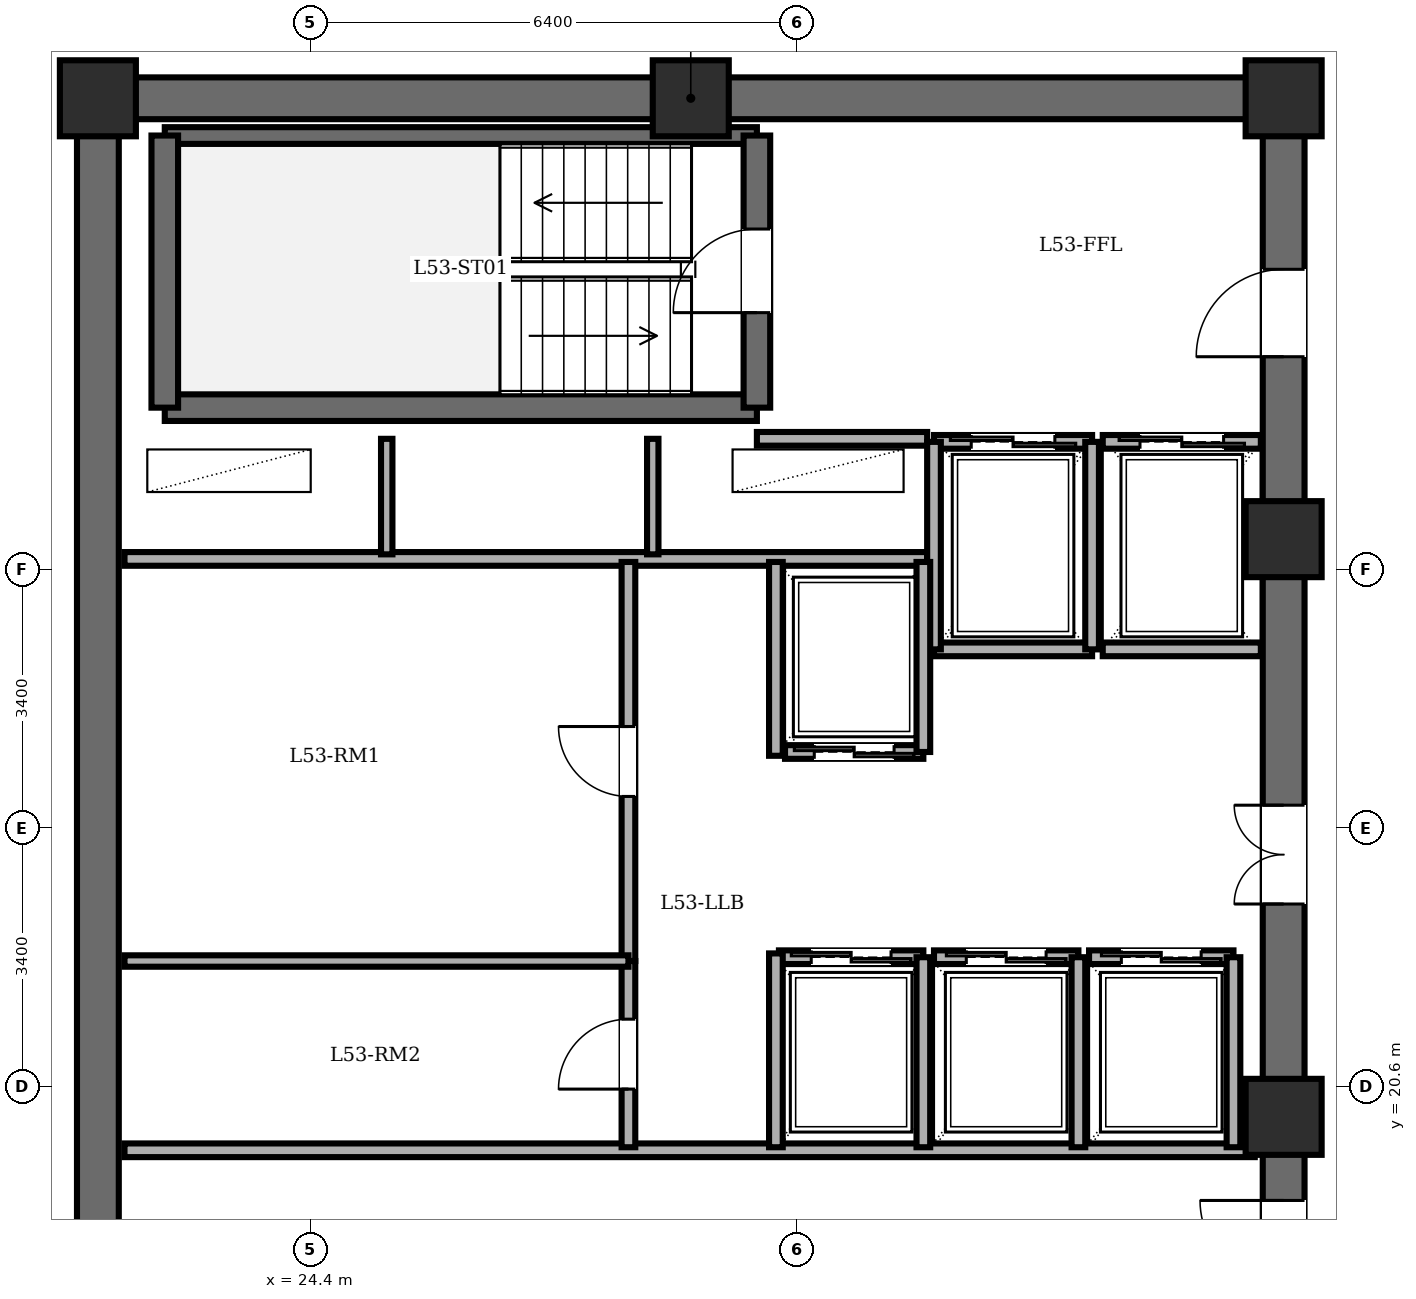
"""IFC4 building model, lengths in metres.
Left out: names, types, materials, properties, quantities, classifications, styles, units other than length and angle.
Written with IfcOpenShell. Run it as: python <this file> out.ifc"""

import sys

from ifc_helpers import new_model, si_unit, direction, frame, frame_2d, origin, origin_2d, place, context, subcontext, project, spatial, rectangle, extrude, element, fill, save


model = new_model("IFC4")
c1 = context("Model", 3, precision=1e-05, world=origin(), true_north=direction((0.0, 1.0)))
c2 = subcontext(c1, "Body", "Model", "MODEL_VIEW")
j1 = project(units=[si_unit("LENGTHUNIT", "METRE"), si_unit("PLANEANGLEUNIT", "RADIAN")], contexts=[c1])
p1 = place(None, origin())
s1 = spatial("IfcSite", under=j1, at=p1, CompositionType="ELEMENT")
p2 = place(p1, origin())
s2 = spatial("IfcBuilding", under=s1, at=p2, CompositionType="ELEMENT")
p3 = place(p2, frame((0.0, 0.0, 204.9)))
s3 = spatial("IfcBuildingStorey", under=s2, at=p3, CompositionType="ELEMENT", Elevation=204.9)
for number, where, z_axis, x_axis in (
    (1, (37.2, 20.2, 0.0), (0.0, 0.0, 1.0), (1.0, 0.0, 0.0)),
    (2, (37.2, 27.8, 0.0), (0.0, 0.0, 1.0), (1.0, 0.0, 0.0)),
    (3, (37.2, 33.6, 0.0), (0.0, 0.0, 1.0), (1.0, 0.0, 0.0)),
    (4, (29.4, 33.6, 0.0), (0.0, 0.0, 1.0), (1.0, 0.0, 0.0)),
    (5, (21.6, 33.6, 0.0), (0.0, 0.0, 1.0), (1.0, 0.0, 0.0)),
):
    element("IfcColumn", number, at=place(p3, frame(where, z_axis=z_axis, x_axis=x_axis)), inside=s3, PredefinedType="COLUMN", context=c2, shape_type="SweptSolid", body=[
        extrude(rectangle(XDim=1.0, YDim=1.0, at=origin_2d()), origin(), (0.0, 0.0, 1.0), 3.6),
    ])
p4 = place(p3, frame((21.6, 14.4, 0.0), z_axis=(0.0, 0.0, 1.0), x_axis=(0.0, 1.0, 0.0)))
e6 = element("IfcWall", 6, at=p4, inside=s3, PredefinedType="SHEAR", context=c2, shape_type="SweptSolid", body=[
    extrude(rectangle(XDim=19.2, YDim=0.55, at=frame_2d((9.6, 0.0))), origin(), (0.0, 0.0, 1.0), 3.4),
])
p5 = place(p3, frame((21.6, 33.6, 0.0), z_axis=(0.0, 0.0, 1.0), x_axis=(1.0, 0.0, 0.0)))
e7 = element("IfcWall", 7, at=p5, inside=s3, PredefinedType="SHEAR", context=c2, shape_type="SweptSolid", body=[
    extrude(rectangle(XDim=15.6, YDim=0.55, at=frame_2d((7.8, 0.0))), origin(), (0.0, 0.0, 1.0), 3.4),
])
p6 = place(p3, frame((37.2, 14.4, 0.0), z_axis=(0.0, 0.0, 1.0), x_axis=(0.0, 1.0, 0.0)))
e8 = element("IfcWall", 8, at=p6, inside=s3, PredefinedType="SHEAR", context=c2, shape_type="SweptSolid", body=[
    extrude(rectangle(XDim=19.2, YDim=0.55, at=frame_2d((9.6, 0.0))), origin(), (0.0, 0.0, 1.0), 3.4),
])
p7 = place(p6, frame((15.8, 0.0, 0.0)))
e9 = element("IfcOpeningElement", 9, at=p7, cuts=e8, PredefinedType="OPENING", context=c2, shape_type="SweptSolid", body=[
    extrude(rectangle(XDim=1.15, YDim=2.15, at=frame_2d((0.575, 1.075))), frame((0.0, 0.285, 0.0), z_axis=(0.0, -1.0, 0.0), x_axis=(1.0, 0.0, 0.0)), (0.0, 0.0, 1.0), 0.57),
])
p8 = place(p6, frame((3.6, 0.0, 0.0)))
e10 = element("IfcOpeningElement", 10, at=p8, cuts=e8, PredefinedType="OPENING", context=c2, shape_type="SweptSolid", body=[
    extrude(rectangle(XDim=1.1, YDim=2.15, at=frame_2d((0.55, 1.075))), frame((0.0, 0.285, 0.0), z_axis=(0.0, -1.0, 0.0), x_axis=(1.0, 0.0, 0.0)), (0.0, 0.0, 1.0), 0.57),
])
p9 = place(p6, frame((8.6, 0.0, 0.0)))
e11 = element("IfcOpeningElement", 11, at=p9, cuts=e8, PredefinedType="OPENING", context=c2, shape_type="SweptSolid", body=[
    extrude(rectangle(XDim=1.3, YDim=2.2, at=frame_2d((0.65, 1.1))), frame((0.0, 0.285, 0.0), z_axis=(0.0, -1.0, 0.0), x_axis=(1.0, 0.0, 0.0)), (0.0, 0.0, 1.0), 0.57),
])
p10 = place(p3, frame((22.48, 29.53, 0.0), z_axis=(0.0, 0.0, 1.0), x_axis=(1.0, 0.0, 0.0)))
e12 = element("IfcWall", 12, at=p10, inside=s3, PredefinedType="SOLIDWALL", context=c2, shape_type="SweptSolid", body=[
    extrude(rectangle(XDim=7.79, YDim=0.35, at=frame_2d((3.895, 0.0))), origin(), (0.0, 0.0, 1.0), 3.4),
])
p11 = place(p3, frame((22.48, 33.11, 0.0), z_axis=(0.0, 0.0, 1.0), x_axis=(1.0, 0.0, 0.0)))
e13 = element("IfcWall", 13, at=p11, inside=s3, PredefinedType="PARTITIONING", context=c2, shape_type="SweptSolid", body=[
    extrude(rectangle(XDim=7.79, YDim=0.22, at=frame_2d((3.895, 0.0))), origin(), (0.0, 0.0, 1.0), 3.4),
])
p12 = place(p3, frame((22.48, 29.53, 0.0), z_axis=(0.0, 0.0, 1.0), x_axis=(0.0, 1.0, 0.0)))
e14 = element("IfcWall", 14, at=p12, inside=s3, PredefinedType="SOLIDWALL", context=c2, shape_type="SweptSolid", body=[
    extrude(rectangle(XDim=3.58, YDim=0.35, at=frame_2d((1.79, 0.0))), origin(), (0.0, 0.0, 1.0), 3.4),
])
p13 = place(p3, frame((30.27, 29.53, 0.0), z_axis=(0.0, 0.0, 1.0), x_axis=(0.0, 1.0, 0.0)))
e15 = element("IfcWall", 15, at=p13, inside=s3, PredefinedType="SOLIDWALL", context=c2, shape_type="SweptSolid", body=[
    extrude(rectangle(XDim=3.58, YDim=0.35, at=frame_2d((1.79, 0.0))), origin(), (0.0, 0.0, 1.0), 3.4),
])
p14 = place(p13, frame((1.25, 0.0, 0.0)))
e16 = element("IfcOpeningElement", 16, at=p14, cuts=e15, PredefinedType="OPENING", context=c2, shape_type="SweptSolid", body=[
    extrude(rectangle(XDim=1.1, YDim=2.15, at=frame_2d((0.55, 1.075))), frame((0.0, 0.185, 0.0), z_axis=(0.0, -1.0, 0.0), x_axis=(1.0, 0.0, 0.0)), (0.0, 0.0, 1.0), 0.37),
])
p15 = place(p3, frame((30.27, 29.12, 0.0), z_axis=(0.0, 0.0, 1.0), x_axis=(1.0, 0.0, 0.0)))
e17 = element("IfcWall", 17, at=p15, inside=s3, PredefinedType="PARTITIONING", context=c2, shape_type="SweptSolid", body=[
    extrude(rectangle(XDim=2.24, YDim=0.18, at=frame_2d((1.12, 0.0))), origin(), (0.0, 0.0, 1.0), 3.4),
])
p16 = place(p3, frame((21.95, 27.54, 0.0), z_axis=(0.0, 0.0, 1.0), x_axis=(1.0, 0.0, 0.0)))
e18 = element("IfcWall", 18, at=p16, inside=s3, PredefinedType="PARTITIONING", context=c2, shape_type="SweptSolid", body=[
    extrude(rectangle(XDim=10.56, YDim=0.18, at=frame_2d((5.28, 0.0))), origin(), (0.0, 0.0, 1.0), 3.4),
])
for number, where, z_axis, x_axis in (
    (19, (25.4, 27.6, 0.0), (0.0, 0.0, 1.0), (0.0, 1.0, 0.0)),
    (20, (28.9, 27.6, 0.0), (0.0, 0.0, 1.0), (0.0, 1.0, 0.0)),
):
    element("IfcWall", number, at=place(p3, frame(where, z_axis=z_axis, x_axis=x_axis)), inside=s3, PredefinedType="PARTITIONING", context=c2, shape_type="SweptSolid", body=[
        extrude(rectangle(XDim=1.52, YDim=0.15, at=frame_2d((0.76, 0.0))), origin(), (0.0, 0.0, 1.0), 3.4),
    ])
p17 = place(p3, frame((21.95, 19.76, 0.0), z_axis=(0.0, 0.0, 1.0), x_axis=(1.0, 0.0, 0.0)))
e21 = element("IfcWall", 21, at=p17, inside=s3, PredefinedType="PARTITIONING", context=c2, shape_type="SweptSolid", body=[
    extrude(rectangle(XDim=14.87, YDim=0.18, at=frame_2d((7.435, 0.0))), origin(), (0.0, 0.0, 1.0), 3.4),
])
p18 = place(p3, frame((32.6, 29.08, 0.0), z_axis=(0.0, 0.0, 1.0), x_axis=(1.0, 0.0, 0.0)))
e22 = element("IfcWall", 22, at=p18, inside=s3, PredefinedType="PARTITIONING", context=c2, shape_type="SweptSolid", body=[
    extrude(rectangle(XDim=2.08, YDim=0.18, at=frame_2d((1.04, 0.0))), origin(), (0.0, 0.0, 1.0), 3.4),
])
p19 = place(p18, frame((0.49, 0.0, 0.0)))
e23 = element("IfcOpeningElement", 23, at=p19, cuts=e22, PredefinedType="OPENING", context=c2, shape_type="SweptSolid", body=[
    extrude(rectangle(XDim=1.1, YDim=2.2, at=frame_2d((0.55, 1.1))), frame((0.0, 0.1, 0.0), z_axis=(0.0, -1.0, 0.0), x_axis=(1.0, 0.0, 0.0)), (0.0, 0.0, 1.0), 0.2),
])
p20 = place(p3, frame((34.68, 26.35, 0.0), z_axis=(0.0, 0.0, 1.0), x_axis=(-1.0, 0.0, 0.0)))
e24 = element("IfcWall", 24, at=p20, inside=s3, PredefinedType="PARTITIONING", context=c2, shape_type="SweptSolid", body=[
    extrude(rectangle(XDim=2.08, YDim=0.18, at=frame_2d((1.04, 0.0))), origin(), (0.0, 0.0, 1.0), 3.4),
])
for number, where, z_axis, x_axis in (
    (25, (34.68, 26.35, 0.0), (0.0, 0.0, 1.0), (0.0, 1.0, 0.0)),
    (26, (32.6, 29.08, 0.0), (0.0, 0.0, 1.0), (0.0, -1.0, 0.0)),
):
    element("IfcWall", number, at=place(p3, frame(where, z_axis=z_axis, x_axis=x_axis)), inside=s3, PredefinedType="PARTITIONING", context=c2, shape_type="SweptSolid", body=[
        extrude(rectangle(XDim=2.73, YDim=0.18, at=frame_2d((1.365, 0.0))), origin(), (0.0, 0.0, 1.0), 3.4),
    ])
p21 = place(p3, frame((34.82, 29.08, 0.0), z_axis=(0.0, 0.0, 1.0), x_axis=(1.0, 0.0, 0.0)))
e27 = element("IfcWall", 27, at=p21, inside=s3, PredefinedType="PARTITIONING", context=c2, shape_type="SweptSolid", body=[
    extrude(rectangle(XDim=2.08, YDim=0.18, at=frame_2d((1.04, 0.0))), origin(), (0.0, 0.0, 1.0), 3.4),
])
p22 = place(p21, frame((0.49, 0.0, 0.0)))
e28 = element("IfcOpeningElement", 28, at=p22, cuts=e27, PredefinedType="OPENING", context=c2, shape_type="SweptSolid", body=[
    extrude(rectangle(XDim=1.1, YDim=2.2, at=frame_2d((0.55, 1.1))), frame((0.0, 0.1, 0.0), z_axis=(0.0, -1.0, 0.0), x_axis=(1.0, 0.0, 0.0)), (0.0, 0.0, 1.0), 0.2),
])
p23 = place(p3, frame((36.9, 26.35, 0.0), z_axis=(0.0, 0.0, 1.0), x_axis=(-1.0, 0.0, 0.0)))
e29 = element("IfcWall", 29, at=p23, inside=s3, PredefinedType="PARTITIONING", context=c2, shape_type="SweptSolid", body=[
    extrude(rectangle(XDim=2.08, YDim=0.18, at=frame_2d((1.04, 0.0))), origin(), (0.0, 0.0, 1.0), 3.4),
])
p24 = place(p3, frame((32.46, 25.0, 0.0), z_axis=(0.0, 0.0, 1.0), x_axis=(-1.0, 0.0, 0.0)))
e30 = element("IfcWall", 30, at=p24, inside=s3, PredefinedType="PARTITIONING", context=c2, shape_type="SweptSolid", body=[
    extrude(rectangle(XDim=1.82, YDim=0.18, at=frame_2d((0.91, 0.0))), origin(), (0.0, 0.0, 1.0), 3.4),
])
p25 = place(p24, frame((0.385, 0.0, 0.0)))
e31 = element("IfcOpeningElement", 31, at=p25, cuts=e30, PredefinedType="OPENING", context=c2, shape_type="SweptSolid", body=[
    extrude(rectangle(XDim=1.05, YDim=2.2, at=frame_2d((0.525, 1.1))), frame((0.0, 0.1, 0.0), z_axis=(0.0, -1.0, 0.0), x_axis=(1.0, 0.0, 0.0)), (0.0, 0.0, 1.0), 0.2),
])
p26 = place(p3, frame((32.46, 25.0, 0.0), z_axis=(0.0, 0.0, 1.0), x_axis=(0.0, 1.0, 0.0)))
e32 = element("IfcWall", 32, at=p26, inside=s3, PredefinedType="PARTITIONING", context=c2, shape_type="SweptSolid", body=[
    extrude(rectangle(XDim=2.5, YDim=0.18, at=frame_2d((1.25, 0.0))), origin(), (0.0, 0.0, 1.0), 3.4),
])
p27 = place(p3, frame((30.56, 22.3, 0.0), z_axis=(0.0, 0.0, 1.0), x_axis=(1.0, 0.0, 0.0)))
e33 = element("IfcWall", 33, at=p27, inside=s3, PredefinedType="PARTITIONING", context=c2, shape_type="SweptSolid", body=[
    extrude(rectangle(XDim=1.9, YDim=0.18, at=frame_2d((0.95, 0.0))), origin(), (0.0, 0.0, 1.0), 3.4),
])
p28 = place(p27, frame((0.425, 0.0, 0.0)))
e34 = element("IfcOpeningElement", 34, at=p28, cuts=e33, PredefinedType="OPENING", context=c2, shape_type="SweptSolid", body=[
    extrude(rectangle(XDim=1.05, YDim=2.2, at=frame_2d((0.525, 1.1))), frame((0.0, 0.1, 0.0), z_axis=(0.0, -1.0, 0.0), x_axis=(1.0, 0.0, 0.0)), (0.0, 0.0, 1.0), 0.2),
])
p29 = place(p3, frame((32.46, 19.8, 0.0), z_axis=(0.0, 0.0, 1.0), x_axis=(0.0, 1.0, 0.0)))
e35 = element("IfcWall", 35, at=p29, inside=s3, PredefinedType="PARTITIONING", context=c2, shape_type="SweptSolid", body=[
    extrude(rectangle(XDim=2.5, YDim=0.18, at=frame_2d((1.25, 0.0))), origin(), (0.0, 0.0, 1.0), 3.4),
])
p30 = place(p3, frame((32.6, 22.3, 0.0), z_axis=(0.0, 0.0, 1.0), x_axis=(1.0, 0.0, 0.0)))
e36 = element("IfcWall", 36, at=p30, inside=s3, PredefinedType="PARTITIONING", context=c2, shape_type="SweptSolid", body=[
    extrude(rectangle(XDim=1.9, YDim=0.18, at=frame_2d((0.95, 0.0))), origin(), (0.0, 0.0, 1.0), 3.4),
])
p31 = place(p30, frame((0.425, 0.0, 0.0)))
e37 = element("IfcOpeningElement", 37, at=p31, cuts=e36, PredefinedType="OPENING", context=c2, shape_type="SweptSolid", body=[
    extrude(rectangle(XDim=1.05, YDim=2.2, at=frame_2d((0.525, 1.1))), frame((0.0, 0.1, 0.0), z_axis=(0.0, -1.0, 0.0), x_axis=(1.0, 0.0, 0.0)), (0.0, 0.0, 1.0), 0.2),
])
p32 = place(p3, frame((34.5, 19.8, 0.0), z_axis=(0.0, 0.0, 1.0), x_axis=(0.0, 1.0, 0.0)))
e38 = element("IfcWall", 38, at=p32, inside=s3, PredefinedType="PARTITIONING", context=c2, shape_type="SweptSolid", body=[
    extrude(rectangle(XDim=2.5, YDim=0.18, at=frame_2d((1.25, 0.0))), origin(), (0.0, 0.0, 1.0), 3.4),
])
p33 = place(p3, frame((34.64, 22.3, 0.0), z_axis=(0.0, 0.0, 1.0), x_axis=(1.0, 0.0, 0.0)))
e39 = element("IfcWall", 39, at=p33, inside=s3, PredefinedType="PARTITIONING", context=c2, shape_type="SweptSolid", body=[
    extrude(rectangle(XDim=1.9, YDim=0.18, at=frame_2d((0.95, 0.0))), origin(), (0.0, 0.0, 1.0), 3.4),
])
p34 = place(p33, frame((0.425, 0.0, 0.0)))
e40 = element("IfcOpeningElement", 40, at=p34, cuts=e39, PredefinedType="OPENING", context=c2, shape_type="SweptSolid", body=[
    extrude(rectangle(XDim=1.05, YDim=2.2, at=frame_2d((0.525, 1.1))), frame((0.0, 0.1, 0.0), z_axis=(0.0, -1.0, 0.0), x_axis=(1.0, 0.0, 0.0)), (0.0, 0.0, 1.0), 0.2),
])
p35 = place(p3, frame((36.54, 19.8, 0.0), z_axis=(0.0, 0.0, 1.0), x_axis=(0.0, 1.0, 0.0)))
e41 = element("IfcWall", 41, at=p35, inside=s3, PredefinedType="PARTITIONING", context=c2, shape_type="SweptSolid", body=[
    extrude(rectangle(XDim=2.5, YDim=0.18, at=frame_2d((1.25, 0.0))), origin(), (0.0, 0.0, 1.0), 3.4),
])
for number, where, z_axis, x_axis in (
    (42, (30.52, 24.95, 0.0), (0.0, 0.0, 1.0), (0.0, 1.0, 0.0)),
    (43, (30.52, 19.8, 0.0), (0.0, 0.0, 1.0), (0.0, 1.0, 0.0)),
):
    element("IfcWall", number, at=place(p3, frame(where, z_axis=z_axis, x_axis=x_axis)), inside=s3, PredefinedType="PARTITIONING", context=c2, shape_type="SweptSolid", body=[
        extrude(rectangle(XDim=2.55, YDim=0.18, at=frame_2d((1.275, 0.0))), origin(), (0.0, 0.0, 1.0), 3.4),
    ])
p36 = place(p3, frame((28.58, 22.25, 0.0), z_axis=(0.0, 0.0, 1.0), x_axis=(0.0, 1.0, 0.0)))
e44 = element("IfcWall", 44, at=p36, inside=s3, PredefinedType="PARTITIONING", context=c2, shape_type="SweptSolid", body=[
    extrude(rectangle(XDim=5.25, YDim=0.18, at=frame_2d((2.625, 0.0))), origin(), (0.0, 0.0, 1.0), 3.4),
])
p37 = place(p36, frame((2.165, 0.0, 0.0)))
e45 = element("IfcOpeningElement", 45, at=p37, cuts=e44, PredefinedType="OPENING", context=c2, shape_type="SweptSolid", body=[
    extrude(rectangle(XDim=0.92, YDim=2.1, at=frame_2d((0.46, 1.05))), frame((0.0, 0.1, 0.0), z_axis=(0.0, -1.0, 0.0), x_axis=(1.0, 0.0, 0.0)), (0.0, 0.0, 1.0), 0.2),
])
p38 = place(p3, frame((28.58, 19.8, 0.0), z_axis=(0.0, 0.0, 1.0), x_axis=(0.0, 1.0, 0.0)))
e46 = element("IfcWall", 46, at=p38, inside=s3, PredefinedType="PARTITIONING", context=c2, shape_type="SweptSolid", body=[
    extrude(rectangle(XDim=2.45, YDim=0.18, at=frame_2d((1.225, 0.0))), origin(), (0.0, 0.0, 1.0), 3.4),
])
p39 = place(p38, frame((0.765, 0.0, 0.0)))
e47 = element("IfcOpeningElement", 47, at=p39, cuts=e46, PredefinedType="OPENING", context=c2, shape_type="SweptSolid", body=[
    extrude(rectangle(XDim=0.92, YDim=2.1, at=frame_2d((0.46, 1.05))), frame((0.0, 0.1, 0.0), z_axis=(0.0, -1.0, 0.0), x_axis=(1.0, 0.0, 0.0)), (0.0, 0.0, 1.0), 0.2),
])
p40 = place(p3, frame((21.95, 22.25, 0.0), z_axis=(0.0, 0.0, 1.0), x_axis=(1.0, 0.0, 0.0)))
e48 = element("IfcWall", 48, at=p40, inside=s3, PredefinedType="PARTITIONING", context=c2, shape_type="SweptSolid", body=[
    extrude(rectangle(XDim=6.63, YDim=0.15, at=frame_2d((3.315, 0.0))), origin(), (0.0, 0.0, 1.0), 3.4),
])
p41 = place(p14, origin())
e49 = element("IfcDoor", 49, at=p41, inside=s3, OperationType="SINGLE_SWING_LEFT", PredefinedType="DOOR", context=c2, shape_type="SweptSolid", body=[
    extrude(rectangle(XDim=1.1, YDim=2.15, at=frame_2d((0.55, 1.075))), frame((0.0, 0.025, 0.0), z_axis=(0.0, -1.0, 0.0), x_axis=(1.0, 0.0, 0.0)), (0.0, 0.0, 1.0), 0.05),
])
fill(e16, e49)
p42 = place(p7, origin())
e50 = element("IfcDoor", 50, at=p42, inside=s3, OperationType="SINGLE_SWING_LEFT", PredefinedType="DOOR", context=c2, shape_type="SweptSolid", body=[
    extrude(rectangle(XDim=1.15, YDim=2.15, at=frame_2d((0.575, 1.075))), frame((0.0, 0.025, 0.0), z_axis=(0.0, -1.0, 0.0), x_axis=(1.0, 0.0, 0.0)), (0.0, 0.0, 1.0), 0.05),
])
fill(e9, e50)
p43 = place(p8, origin())
e51 = element("IfcDoor", 51, at=p43, inside=s3, OperationType="SINGLE_SWING_RIGHT", PredefinedType="DOOR", context=c2, shape_type="SweptSolid", body=[
    extrude(rectangle(XDim=1.1, YDim=2.15, at=frame_2d((0.55, 1.075))), frame((0.0, 0.025, 0.0), z_axis=(0.0, -1.0, 0.0), x_axis=(1.0, 0.0, 0.0)), (0.0, 0.0, 1.0), 0.05),
])
fill(e10, e51)
p44 = place(p19, origin())
e52 = element("IfcDoor", 52, at=p44, inside=s3, OperationType="DOUBLE_DOOR_SLIDING", PredefinedType="DOOR", context=c2, shape_type="SweptSolid", body=[
    extrude(rectangle(XDim=1.1, YDim=2.2, at=frame_2d((0.55, 1.1))), frame((0.0, 0.025, 0.0), z_axis=(0.0, -1.0, 0.0), x_axis=(1.0, 0.0, 0.0)), (0.0, 0.0, 1.0), 0.05),
])
fill(e23, e52)
p45 = place(p22, origin())
e53 = element("IfcDoor", 53, at=p45, inside=s3, OperationType="DOUBLE_DOOR_SLIDING", PredefinedType="DOOR", context=c2, shape_type="SweptSolid", body=[
    extrude(rectangle(XDim=1.1, YDim=2.2, at=frame_2d((0.55, 1.1))), frame((0.0, 0.025, 0.0), z_axis=(0.0, -1.0, 0.0), x_axis=(1.0, 0.0, 0.0)), (0.0, 0.0, 1.0), 0.05),
])
fill(e28, e53)
p46 = place(p25, origin())
e54 = element("IfcDoor", 54, at=p46, inside=s3, OperationType="DOUBLE_DOOR_SLIDING", PredefinedType="DOOR", context=c2, shape_type="SweptSolid", body=[
    extrude(rectangle(XDim=1.05, YDim=2.2, at=frame_2d((0.525, 1.1))), frame((0.0, 0.025, 0.0), z_axis=(0.0, -1.0, 0.0), x_axis=(1.0, 0.0, 0.0)), (0.0, 0.0, 1.0), 0.05),
])
fill(e31, e54)
p47 = place(p28, origin())
e55 = element("IfcDoor", 55, at=p47, inside=s3, OperationType="DOUBLE_DOOR_SLIDING", PredefinedType="DOOR", context=c2, shape_type="SweptSolid", body=[
    extrude(rectangle(XDim=1.05, YDim=2.2, at=frame_2d((0.525, 1.1))), frame((0.0, 0.025, 0.0), z_axis=(0.0, -1.0, 0.0), x_axis=(1.0, 0.0, 0.0)), (0.0, 0.0, 1.0), 0.05),
])
fill(e34, e55)
p48 = place(p31, origin())
e56 = element("IfcDoor", 56, at=p48, inside=s3, OperationType="DOUBLE_DOOR_SLIDING", PredefinedType="DOOR", context=c2, shape_type="SweptSolid", body=[
    extrude(rectangle(XDim=1.05, YDim=2.2, at=frame_2d((0.525, 1.1))), frame((0.0, 0.025, 0.0), z_axis=(0.0, -1.0, 0.0), x_axis=(1.0, 0.0, 0.0)), (0.0, 0.0, 1.0), 0.05),
])
fill(e37, e56)
p49 = place(p34, origin())
e57 = element("IfcDoor", 57, at=p49, inside=s3, OperationType="DOUBLE_DOOR_SLIDING", PredefinedType="DOOR", context=c2, shape_type="SweptSolid", body=[
    extrude(rectangle(XDim=1.05, YDim=2.2, at=frame_2d((0.525, 1.1))), frame((0.0, 0.025, 0.0), z_axis=(0.0, -1.0, 0.0), x_axis=(1.0, 0.0, 0.0)), (0.0, 0.0, 1.0), 0.05),
])
fill(e40, e57)
p50 = place(p37, origin())
e58 = element("IfcDoor", 58, at=p50, inside=s3, OperationType="SINGLE_SWING_RIGHT", PredefinedType="DOOR", context=c2, shape_type="SweptSolid", body=[
    extrude(rectangle(XDim=0.92, YDim=2.1, at=frame_2d((0.46, 1.05))), frame((0.0, 0.025, 0.0), z_axis=(0.0, -1.0, 0.0), x_axis=(1.0, 0.0, 0.0)), (0.0, 0.0, 1.0), 0.05),
])
fill(e45, e58)
p51 = place(p39, origin())
e59 = element("IfcDoor", 59, at=p51, inside=s3, OperationType="SINGLE_SWING_LEFT", PredefinedType="DOOR", context=c2, shape_type="SweptSolid", body=[
    extrude(rectangle(XDim=0.92, YDim=2.1, at=frame_2d((0.46, 1.05))), frame((0.0, 0.025, 0.0), z_axis=(0.0, -1.0, 0.0), x_axis=(1.0, 0.0, 0.0)), (0.0, 0.0, 1.0), 0.05),
])
fill(e47, e59)
p52 = place(p9, origin())
e60 = element("IfcDoor", 60, at=p52, inside=s3, OperationType="DOUBLE_DOOR_SINGLE_SWING", PredefinedType="DOOR", context=c2, shape_type="SweptSolid", body=[
    extrude(rectangle(XDim=1.3, YDim=2.2, at=frame_2d((0.65, 1.1))), frame((0.0, 0.025, 0.0), z_axis=(0.0, -1.0, 0.0), x_axis=(1.0, 0.0, 0.0)), (0.0, 0.0, 1.0), 0.05),
])
fill(e11, e60)
save(model, sys.argv[1])
